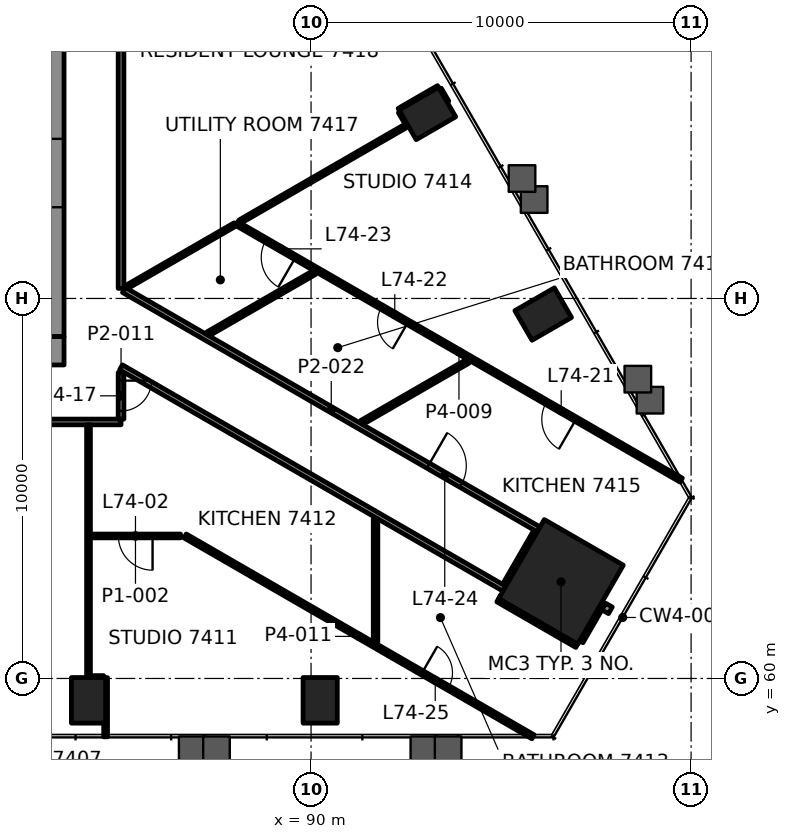
"""IFC4 building model, lengths in metres.
Left out: names, types, materials, properties, quantities, classifications, styles, units other than length and angle.
Written with IfcOpenShell. Run it as: python <this file> out.ifc"""

import sys

from ifc_helpers import new_model, si_unit, direction, frame, frame_2d, origin, origin_2d, place, context, subcontext, project, spatial, rectangle, hollow_rectangle, extrude, element, fill, save


model = new_model("IFC4")
c1 = context("Model", 3, precision=1e-05, world=origin(), true_north=direction((0.0, 1.0)))
c2 = subcontext(c1, "Body", "Model", "MODEL_VIEW")
j1 = project(units=[si_unit("LENGTHUNIT", "METRE"), si_unit("PLANEANGLEUNIT", "RADIAN")], contexts=[c1])
p1 = place(None, origin())
s1 = spatial("IfcSite", under=j1, at=p1, CompositionType="ELEMENT")
p2 = place(p1, origin())
s2 = spatial("IfcBuilding", under=s1, at=p2, CompositionType="ELEMENT")
p3 = place(p2, frame((0.0, 0.0, 305.6)))
s3 = spatial("IfcBuildingStorey", under=s2, at=p3, CompositionType="ELEMENT", Elevation=305.6)
p4 = place(p3, frame((96.577, 62.542, 0.0), z_axis=(0.0, 0.0, 1.0), x_axis=(0.5, 0.866025403784, 0.0)))
e1 = element("IfcColumn", 1, at=p4, inside=s3, PredefinedType="COLUMN", context=c2, shape_type="SweptSolid", body=[
    extrude(rectangle(XDim=2.4, YDim=2.4, at=origin_2d()), origin(), (0.0, 0.0, 1.0), 3.5),
])
for number, where, z_axis, x_axis in (
    (2, (84.144, 59.425, -0.0), (0.0, 0.0, 1.0), (1.0, 0.0, 0.0)),
    (3, (90.24, 59.425, -0.0), (0.0, 0.0, 1.0), (1.0, 0.0, 0.0)),
    (4, (96.109, 69.589, -0.0), (0.0, 0.0, 1.0), (-0.5, 0.866, 0.0)),
    (5, (93.061, 74.869, -0.0), (0.0, 0.0, 1.0), (-0.5, 0.866, 0.0)),
):
    element("IfcColumn", number, at=place(p3, frame(where, z_axis=z_axis, x_axis=x_axis)), inside=s3, PredefinedType="COLUMN", context=c2, shape_type="SweptSolid", body=[
        extrude(hollow_rectangle(XDim=0.9, YDim=1.2, WallThickness=0.06, at=origin_2d()), origin(), (0.0, 0.0, 1.0), 3.5),
    ])
p5 = place(p3, frame((66.5, 68.625, 0.0), z_axis=(0.0, 0.0, 1.0), x_axis=(1.0, 0.0, 0.0)))
e6 = element("IfcWall", 6, at=p5, inside=s3, PredefinedType="SHEAR", context=c2, shape_type="SweptSolid", body=[
    extrude(rectangle(XDim=17.0, YDim=0.75, at=frame_2d((8.5, 0.0))), origin(), (0.0, 0.0, 1.0), 3.3),
])
p6 = place(p5, frame((2.7, 0.0, 0.0)))
e7 = element("IfcOpeningElement", 7, at=p6, cuts=e6, PredefinedType="OPENING", context=c2, shape_type="SweptSolid", body=[
    extrude(rectangle(XDim=0.9, YDim=2.1, at=frame_2d((0.45, 1.05))), frame((0.0, 0.385, 0.0), z_axis=(0.0, -1.0, 0.0), x_axis=(1.0, 0.0, 0.0)), (0.0, 0.0, 1.0), 0.77),
])
p7 = place(p3, frame((83.125, 69.0, 0.0), z_axis=(0.0, 0.0, 1.0), x_axis=(0.0, 1.0, 0.0)))
e8 = element("IfcWall", 8, at=p7, inside=s3, PredefinedType="SHEAR", context=c2, shape_type="SweptSolid", body=[
    extrude(rectangle(XDim=12.0, YDim=0.75, at=frame_2d((6.0, 0.0))), origin(), (0.0, 0.0, 1.0), 3.3),
])
p8 = place(p7, frame((3.4, 0.0, 0.0)))
e9 = element("IfcOpeningElement", 9, at=p8, cuts=e8, PredefinedType="OPENING", context=c2, shape_type="SweptSolid", body=[
    extrude(rectangle(XDim=1.8, YDim=2.1, at=frame_2d((0.9, 1.05))), frame((0.0, 0.385, 0.0), z_axis=(0.0, -1.0, 0.0), x_axis=(1.0, 0.0, 0.0)), (0.0, 0.0, 1.0), 0.77),
])
p9 = place(p3, frame((84.194, 60.025, 0.0), z_axis=(0.0, 0.0, 1.0), x_axis=(1.0, 0.0, 0.0)))
e10 = element("IfcWall", 10, at=p9, inside=s3, PredefinedType="PARTITIONING", context=c2, shape_type="SweptSolid", body=[
    extrude(rectangle(XDim=0.347, YDim=0.1, at=frame_2d((0.173, 0.0))), origin(), (0.0, 0.0, 1.0), 2.7),
])
p10 = place(p3, frame((86.566, 63.75, 0.0), z_axis=(0.0, 0.0, 1.0), x_axis=(-1.0, 0.0, 0.0)))
e11 = element("IfcWall", 11, at=p10, inside=s3, PredefinedType="PARTITIONING", context=c2, shape_type="SweptSolid", body=[
    extrude(rectangle(XDim=2.372, YDim=0.1, at=frame_2d((1.186, 0.0))), origin(), (0.0, 0.0, 1.0), 2.7),
])
p11 = place(p10, frame((0.736, 0.0, 0.0)))
e12 = element("IfcOpeningElement", 12, at=p11, cuts=e11, PredefinedType="OPENING", context=c2, shape_type="SweptSolid", body=[
    extrude(rectangle(XDim=0.9, YDim=2.1, at=frame_2d((0.45, 1.05))), frame((0.0, 0.06, 0.0), z_axis=(0.0, -1.0, 0.0), x_axis=(1.0, 0.0, 0.0)), (0.0, 0.0, 1.0), 0.12),
])
p12 = place(p3, frame((85.0, 66.75, 0.0), z_axis=(0.0, 0.0, 1.0), x_axis=(-1.0, 0.0, 0.0)))
e13 = element("IfcWall", 13, at=p12, inside=s3, PredefinedType="PARTITIONING", context=c2, shape_type="SweptSolid", body=[
    extrude(rectangle(XDim=20.0, YDim=0.15, at=frame_2d((10.0, 0.0))), origin(), (0.0, 0.0, 1.0), 2.7),
])
p13 = place(p12, frame((5.486, 0.0, 0.0)))
e14 = element("IfcOpeningElement", 14, at=p13, cuts=e13, PredefinedType="OPENING", context=c2, shape_type="SweptSolid", body=[
    extrude(rectangle(XDim=0.9, YDim=2.1, at=frame_2d((0.45, 1.05))), frame((0.0, 0.085, 0.0), z_axis=(0.0, -1.0, 0.0), x_axis=(1.0, 0.0, 0.0)), (0.0, 0.0, 1.0), 0.17),
])
p14 = place(p12, frame((11.582, 0.0, 0.0)))
e15 = element("IfcOpeningElement", 15, at=p14, cuts=e13, PredefinedType="OPENING", context=c2, shape_type="SweptSolid", body=[
    extrude(rectangle(XDim=0.9, YDim=2.1, at=frame_2d((0.45, 1.05))), frame((0.0, 0.085, 0.0), z_axis=(0.0, -1.0, 0.0), x_axis=(1.0, 0.0, 0.0)), (0.0, 0.0, 1.0), 0.17),
])
p15 = place(p12, frame((13.614, 0.0, 0.0)))
e16 = element("IfcOpeningElement", 16, at=p15, cuts=e13, PredefinedType="OPENING", context=c2, shape_type="SweptSolid", body=[
    extrude(rectangle(XDim=0.9, YDim=2.1, at=frame_2d((0.45, 1.05))), frame((0.0, 0.085, 0.0), z_axis=(0.0, -1.0, 0.0), x_axis=(1.0, 0.0, 0.0)), (0.0, 0.0, 1.0), 0.17),
])
p16 = place(p12, frame((15.646, 0.0, 0.0)))
e17 = element("IfcOpeningElement", 17, at=p16, cuts=e13, PredefinedType="OPENING", context=c2, shape_type="SweptSolid", body=[
    extrude(rectangle(XDim=0.9, YDim=2.1, at=frame_2d((0.45, 1.05))), frame((0.0, 0.085, 0.0), z_axis=(0.0, -1.0, 0.0), x_axis=(1.0, 0.0, 0.0)), (0.0, 0.0, 1.0), 0.17),
])
p17 = place(p12, frame((17.678, 0.0, 0.0)))
e18 = element("IfcOpeningElement", 18, at=p17, cuts=e13, PredefinedType="OPENING", context=c2, shape_type="SweptSolid", body=[
    extrude(rectangle(XDim=0.9, YDim=2.1, at=frame_2d((0.45, 1.05))), frame((0.0, 0.085, 0.0), z_axis=(0.0, -1.0, 0.0), x_axis=(1.0, 0.0, 0.0)), (0.0, 0.0, 1.0), 0.17),
])
for number, where, z_axis, x_axis in (
    (19, (91.333, 66.736, 0.0), (0.0, 0.0, 1.0), (0.866, 0.5, 0.0)),
    (20, (87.292, 69.069, 0.0), (0.0, 0.0, 1.0), (0.866, 0.5, 0.0)),
):
    element("IfcWall", number, at=place(p3, frame(where, z_axis=z_axis, x_axis=x_axis)), inside=s3, PredefinedType="PARTITIONING", context=c2, shape_type="SweptSolid", body=[
        extrude(rectangle(XDim=3.228, YDim=0.12, at=frame_2d((1.614, 0.0))), origin(), (0.0, 0.0, 1.0), 2.7),
    ])
p18 = place(p3, frame((85.145, 70.299, 0.0), z_axis=(0.0, 0.0, 1.0), x_axis=(0.866032610133, 0.499987518031, 0.0)))
e21 = element("IfcWall", 21, at=p18, inside=s3, PredefinedType="PARTITIONING", context=c2, shape_type="SweptSolid", body=[
    extrude(rectangle(XDim=3.295, YDim=0.1, at=frame_2d((1.648, 0.0))), origin(), (0.0, 0.0, 1.0), 2.7),
])
p19 = place(p3, frame((92.318, 74.959, 0.0), z_axis=(0.0, 0.0, 1.0), x_axis=(0.866087020037, 0.499893262331, 0.0)))
e22 = element("IfcWall", 22, at=p19, inside=s3, PredefinedType="PARTITIONING", context=c2, shape_type="SweptSolid", body=[
    extrude(rectangle(XDim=1.196, YDim=0.1, at=frame_2d((0.598, 0.0))), origin(), (0.0, 0.0, 1.0), 2.688),
])
p20 = place(p3, frame((97.067, 60.99, 0.0), z_axis=(0.0, 0.0, 1.0), x_axis=(0.499818604933, 0.866130106949, 0.0)))
e23 = element("IfcWall", 23, at=p20, inside=s3, PredefinedType="PARTITIONING", context=c2, shape_type="SweptSolid", body=[
    extrude(rectangle(XDim=1.099, YDim=0.2, at=frame_2d((0.55, 0.0))), origin(), (0.0, 0.0, 1.0), 2.7),
])
p21 = place(p3, frame((95.128, 62.433, 0.0), z_axis=(0.0, 0.0, 1.0), x_axis=(0.500052415518, 0.865995139556, 0.0)))
e24 = element("IfcWall", 24, at=p21, inside=s3, PredefinedType="PARTITIONING", context=c2, shape_type="SweptSolid", body=[
    extrude(rectangle(XDim=1.644, YDim=0.2, at=frame_2d((0.822, 0.0))), origin(), (0.0, 0.0, 1.0), 2.547),
])
p22 = place(p3, frame((91.697, 60.966, 0.0), z_axis=(0.0, 0.0, 1.0), x_axis=(0.0, 1.0, 0.0)))
e25 = element("IfcWall", 25, at=p22, inside=s3, PredefinedType="PARTITIONING", context=c2, shape_type="SweptSolid", body=[
    extrude(rectangle(XDim=3.228, YDim=0.12, at=frame_2d((1.614, 0.0))), origin(), (0.0, 0.0, 1.0), 2.7),
])
p23 = place(p3, frame((85.0, 68.051, 0.0), z_axis=(0.0, 0.0, 1.0), x_axis=(0.0, -1.0, 0.0)))
e26 = element("IfcWall", 26, at=p23, inside=s3, PredefinedType="PARTITIONING", context=c2, shape_type="SweptSolid", body=[
    extrude(rectangle(XDim=1.226, YDim=0.15, at=frame_2d((0.613, 0.0))), origin(), (0.0, 0.0, 1.0), 2.547),
])
p24 = place(p23, frame((0.213, 0.0, 0.0)))
e27 = element("IfcOpeningElement", 27, at=p24, cuts=e26, PredefinedType="OPENING", context=c2, shape_type="SweptSolid", body=[
    extrude(rectangle(XDim=0.8, YDim=2.1, at=frame_2d((0.4, 1.05))), frame((0.0, 0.085, 0.0), z_axis=(0.0, -1.0, 0.0), x_axis=(1.0, 0.0, 0.0)), (0.0, 0.0, 1.0), 0.17),
])
p25 = place(p3, frame((85.0, 70.266, 0.0), z_axis=(0.0, 0.0, 1.0), x_axis=(0.0, 1.0, 0.0)))
e28 = element("IfcWall", 28, at=p25, inside=s3, PredefinedType="PARTITIONING", context=c2, shape_type="SweptSolid", body=[
    extrude(rectangle(XDim=12.982, YDim=0.15, at=frame_2d((6.491, 0.0))), origin(), (0.0, 0.0, 1.0), 2.7),
])
p26 = place(p3, frame((84.594, 58.465, 0.0), z_axis=(0.0, 0.0, 1.0), x_axis=(0.0, 1.0, 0.0)))
e29 = element("IfcWall", 29, at=p26, inside=s3, PredefinedType="PARTITIONING", context=c2, shape_type="SweptSolid", body=[
    extrude(rectangle(XDim=1.557, YDim=0.1, at=frame_2d((0.778, 0.0))), origin(), (0.0, 0.0, 1.0), 2.7),
])
p27 = place(p3, frame((84.144, 60.025, 0.0), z_axis=(0.0, 0.0, 1.0), x_axis=(0.0, 1.0, 0.0)))
e30 = element("IfcWall", 30, at=p27, inside=s3, PredefinedType="PARTITIONING", context=c2, shape_type="SweptSolid", body=[
    extrude(rectangle(XDim=6.65, YDim=0.1, at=frame_2d((3.325, 0.0))), origin(), (0.0, 0.0, 1.0), 2.7),
])
p28 = place(p3, frame((93.58, 75.169, 0.0), z_axis=(0.0, 0.0, 1.0), x_axis=(-0.500153222552, 0.865936922628, 0.0)))
e31 = element("IfcWall", 31, at=p28, inside=s3, PredefinedType="PARTITIONING", context=c2, shape_type="SweptSolid", body=[
    extrude(rectangle(XDim=0.393, YDim=0.1, at=frame_2d((0.196, 0.0))), origin(), (0.0, 0.0, 1.0), 2.7),
])
p29 = place(p3, frame((92.511, 74.621, 0.0), z_axis=(0.0, 0.0, 1.0), x_axis=(-0.499868360126, 0.866101392762, 0.0)))
e32 = element("IfcWall", 32, at=p29, inside=s3, PredefinedType="PARTITIONING", context=c2, shape_type="SweptSolid", body=[
    extrude(rectangle(XDim=0.338, YDim=0.1, at=frame_2d((0.169, 0.0))), origin(), (0.0, 0.0, 1.0), 2.7),
])
p30 = place(p3, frame((99.74, 65.22, 0.0), z_axis=(0.0, 0.0, 1.0), x_axis=(-0.866029646425, 0.499992651459, 0.0)))
e33 = element("IfcWall", 33, at=p30, inside=s3, PredefinedType="PARTITIONING", context=c2, shape_type="SweptSolid", body=[
    extrude(rectangle(XDim=13.505, YDim=0.12, at=frame_2d((6.752, 0.0))), origin(), (0.0, 0.0, 1.0), 2.7),
])
p31 = place(p30, frame((3.197, 0.0, 0.0)))
e34 = element("IfcOpeningElement", 34, at=p31, cuts=e33, PredefinedType="OPENING", context=c2, shape_type="SweptSolid", body=[
    extrude(rectangle(XDim=0.9, YDim=2.1, at=frame_2d((0.45, 1.05))), frame((0.0, 0.07, 0.0), z_axis=(0.0, -1.0, 0.0), x_axis=(1.0, 0.0, 0.0)), (0.0, 0.0, 1.0), 0.14),
])
p32 = place(p30, frame((8.303, 0.0, 0.0)))
e35 = element("IfcOpeningElement", 35, at=p32, cuts=e33, PredefinedType="OPENING", context=c2, shape_type="SweptSolid", body=[
    extrude(rectangle(XDim=0.8, YDim=2.1, at=frame_2d((0.4, 1.05))), frame((0.0, 0.07, 0.0), z_axis=(0.0, -1.0, 0.0), x_axis=(1.0, 0.0, 0.0)), (0.0, 0.0, 1.0), 0.14),
])
p33 = place(p30, frame((11.721, 0.0, 0.0)))
e36 = element("IfcOpeningElement", 36, at=p33, cuts=e33, PredefinedType="OPENING", context=c2, shape_type="SweptSolid", body=[
    extrude(rectangle(XDim=0.9, YDim=2.1, at=frame_2d((0.45, 1.05))), frame((0.0, 0.07, 0.0), z_axis=(0.0, -1.0, 0.0), x_axis=(1.0, 0.0, 0.0)), (0.0, 0.0, 1.0), 0.14),
])
p34 = place(p3, frame((85.075, 70.222, 0.0), z_axis=(0.0, 0.0, 1.0), x_axis=(0.866023935413, -0.500002543286, 0.0)))
e37 = element("IfcWall", 37, at=p34, inside=s3, PredefinedType="PARTITIONING", context=c2, shape_type="SweptSolid", body=[
    extrude(rectangle(XDim=12.601, YDim=0.15, at=frame_2d((6.3, 0.0))), origin(), (0.0, 0.0, 1.0), 2.7),
])
p35 = place(p34, frame((9.249, 0.0, 0.0)))
e38 = element("IfcOpeningElement", 38, at=p35, cuts=e37, PredefinedType="OPENING", context=c2, shape_type="SweptSolid", body=[
    extrude(rectangle(XDim=1.0, YDim=2.1, at=frame_2d((0.5, 1.05))), frame((0.0, 0.085, 0.0), z_axis=(0.0, -1.0, 0.0), x_axis=(1.0, 0.0, 0.0)), (0.0, 0.0, 1.0), 0.17),
])
p36 = place(p3, frame((97.876, 61.792, 0.0), z_axis=(0.0, 0.0, 1.0), x_axis=(-0.865900389786, 0.500216468111, 0.0)))
e39 = element("IfcWall", 39, at=p36, inside=s3, PredefinedType="PARTITIONING", context=c2, shape_type="SweptSolid", body=[
    extrude(rectangle(XDim=0.2, YDim=0.2, at=frame_2d((0.1, 0.0))), origin(), (0.0, 0.0, 1.0), 2.7),
])
p37 = place(p3, frame((95.088, 62.363, 0.0), z_axis=(0.0, 0.0, 1.0), x_axis=(-0.866026430432, 0.49999822179, 0.0)))
e40 = element("IfcWall", 40, at=p37, inside=s3, PredefinedType="PARTITIONING", context=c2, shape_type="SweptSolid", body=[
    extrude(rectangle(XDim=11.648, YDim=0.15, at=frame_2d((5.824, 0.0))), origin(), (0.0, 0.0, 1.0), 2.547),
])
p38 = place(p3, frame((97.016, 60.904, 0.0), z_axis=(0.0, 0.0, 1.0), x_axis=(-0.866036455013, 0.499980858223, 0.0)))
e41 = element("IfcWall", 41, at=p38, inside=s3, PredefinedType="PARTITIONING", context=c2, shape_type="SweptSolid", body=[
    extrude(rectangle(XDim=2.399, YDim=0.2, at=frame_2d((1.199, 0.0))), origin(), (0.0, 0.0, 1.0), 2.7),
])
p39 = place(p3, frame((86.686, 63.75, 0.0), z_axis=(0.0, 0.0, 1.0), x_axis=(0.866034434898, -0.499984357326, 0.0)))
e42 = element("IfcWall", 42, at=p39, inside=s3, PredefinedType="PARTITIONING", context=c2, shape_type="SweptSolid", body=[
    extrude(rectangle(XDim=10.571, YDim=0.12, at=frame_2d((5.285, 0.0))), origin(), (0.0, 0.0, 1.0), 2.7),
])
p40 = place(p39, frame((7.2, 0.0, 0.0)))
e43 = element("IfcOpeningElement", 43, at=p40, cuts=e42, PredefinedType="OPENING", context=c2, shape_type="SweptSolid", body=[
    extrude(rectangle(XDim=0.8, YDim=2.1, at=frame_2d((0.4, 1.05))), frame((0.0, 0.07, 0.0), z_axis=(0.0, -1.0, 0.0), x_axis=(1.0, 0.0, 0.0)), (0.0, 0.0, 1.0), 0.14),
])
p41 = place(p3, frame((88.129, 72.021, 0.0), z_axis=(0.0, 0.0, 1.0), x_axis=(0.866010809447, 0.500025277282, 0.0)))
e44 = element("IfcWall", 44, at=p41, inside=s3, PredefinedType="PARTITIONING", context=c2, shape_type="SweptSolid", body=[
    extrude(rectangle(XDim=5.094, YDim=0.1, at=frame_2d((2.547, 0.0))), origin(), (0.0, 0.0, 1.0), 2.7),
])
p42 = place(p11, origin())
e45 = element("IfcDoor", 45, at=p42, inside=s3, OperationType="SINGLE_SWING_LEFT", PredefinedType="DOOR", context=c2, shape_type="SweptSolid", body=[
    extrude(rectangle(XDim=0.9, YDim=2.1, at=frame_2d((0.45, 1.05))), frame((0.0, 0.025, 0.0), z_axis=(0.0, -1.0, 0.0), x_axis=(1.0, 0.0, 0.0)), (0.0, 0.0, 1.0), 0.05),
])
fill(e12, e45)
p43 = place(p24, origin())
e46 = element("IfcDoor", 46, at=p43, inside=s3, OperationType="SINGLE_SWING_RIGHT", PredefinedType="DOOR", context=c2, shape_type="SweptSolid", body=[
    extrude(rectangle(XDim=0.8, YDim=2.1, at=frame_2d((0.4, 1.05))), frame((0.0, 0.025, 0.0), z_axis=(0.0, -1.0, 0.0), x_axis=(1.0, 0.0, 0.0)), (0.0, 0.0, 1.0), 0.05),
])
fill(e27, e46)
p44 = place(p31, origin())
e47 = element("IfcDoor", 47, at=p44, inside=s3, OperationType="SINGLE_SWING_RIGHT", PredefinedType="DOOR", context=c2, shape_type="SweptSolid", body=[
    extrude(rectangle(XDim=0.9, YDim=2.1, at=frame_2d((0.45, 1.05))), frame((0.0, 0.025, 0.0), z_axis=(0.0, -1.0, 0.0), x_axis=(1.0, 0.0, 0.0)), (0.0, 0.0, 1.0), 0.05),
])
fill(e34, e47)
p45 = place(p32, origin())
e48 = element("IfcDoor", 48, at=p45, inside=s3, OperationType="SINGLE_SWING_RIGHT", PredefinedType="DOOR", context=c2, shape_type="SweptSolid", body=[
    extrude(rectangle(XDim=0.8, YDim=2.1, at=frame_2d((0.4, 1.05))), frame((0.0, 0.025, 0.0), z_axis=(0.0, -1.0, 0.0), x_axis=(1.0, 0.0, 0.0)), (0.0, 0.0, 1.0), 0.05),
])
fill(e35, e48)
p46 = place(p33, origin())
e49 = element("IfcDoor", 49, at=p46, inside=s3, OperationType="SINGLE_SWING_LEFT", PredefinedType="DOOR", context=c2, shape_type="SweptSolid", body=[
    extrude(rectangle(XDim=0.9, YDim=2.1, at=frame_2d((0.45, 1.05))), frame((0.0, 0.025, 0.0), z_axis=(0.0, -1.0, 0.0), x_axis=(1.0, 0.0, 0.0)), (0.0, 0.0, 1.0), 0.05),
])
fill(e36, e49)
p47 = place(p35, origin())
e50 = element("IfcDoor", 50, at=p47, inside=s3, OperationType="SINGLE_SWING_RIGHT", PredefinedType="DOOR", context=c2, shape_type="SweptSolid", body=[
    extrude(rectangle(XDim=1.0, YDim=2.1, at=frame_2d((0.5, 1.05))), frame((0.0, 0.025, 0.0), z_axis=(0.0, -1.0, 0.0), x_axis=(1.0, 0.0, 0.0)), (0.0, 0.0, 1.0), 0.05),
])
fill(e38, e50)
p48 = place(p40, origin())
e51 = element("IfcDoor", 51, at=p48, inside=s3, OperationType="SINGLE_SWING_LEFT", PredefinedType="DOOR", context=c2, shape_type="SweptSolid", body=[
    extrude(rectangle(XDim=0.8, YDim=2.1, at=frame_2d((0.4, 1.05))), frame((0.0, 0.025, 0.0), z_axis=(0.0, -1.0, 0.0), x_axis=(1.0, 0.0, 0.0)), (0.0, 0.0, 1.0), 0.05),
])
fill(e43, e51)
p49 = place(p8, origin())
e52 = element("IfcDoor", 52, at=p49, inside=s3, OperationType="SINGLE_SWING_LEFT", PredefinedType="DOOR", context=c2, shape_type="SweptSolid", body=[
    extrude(rectangle(XDim=1.8, YDim=2.1, at=frame_2d((0.9, 1.05))), frame((0.0, 0.095, 0.0), z_axis=(0.0, -1.0, 0.0), x_axis=(1.0, 0.0, 0.0)), (0.0, 0.0, 1.0), 0.19),
])
fill(e9, e52)
save(model, sys.argv[1])
